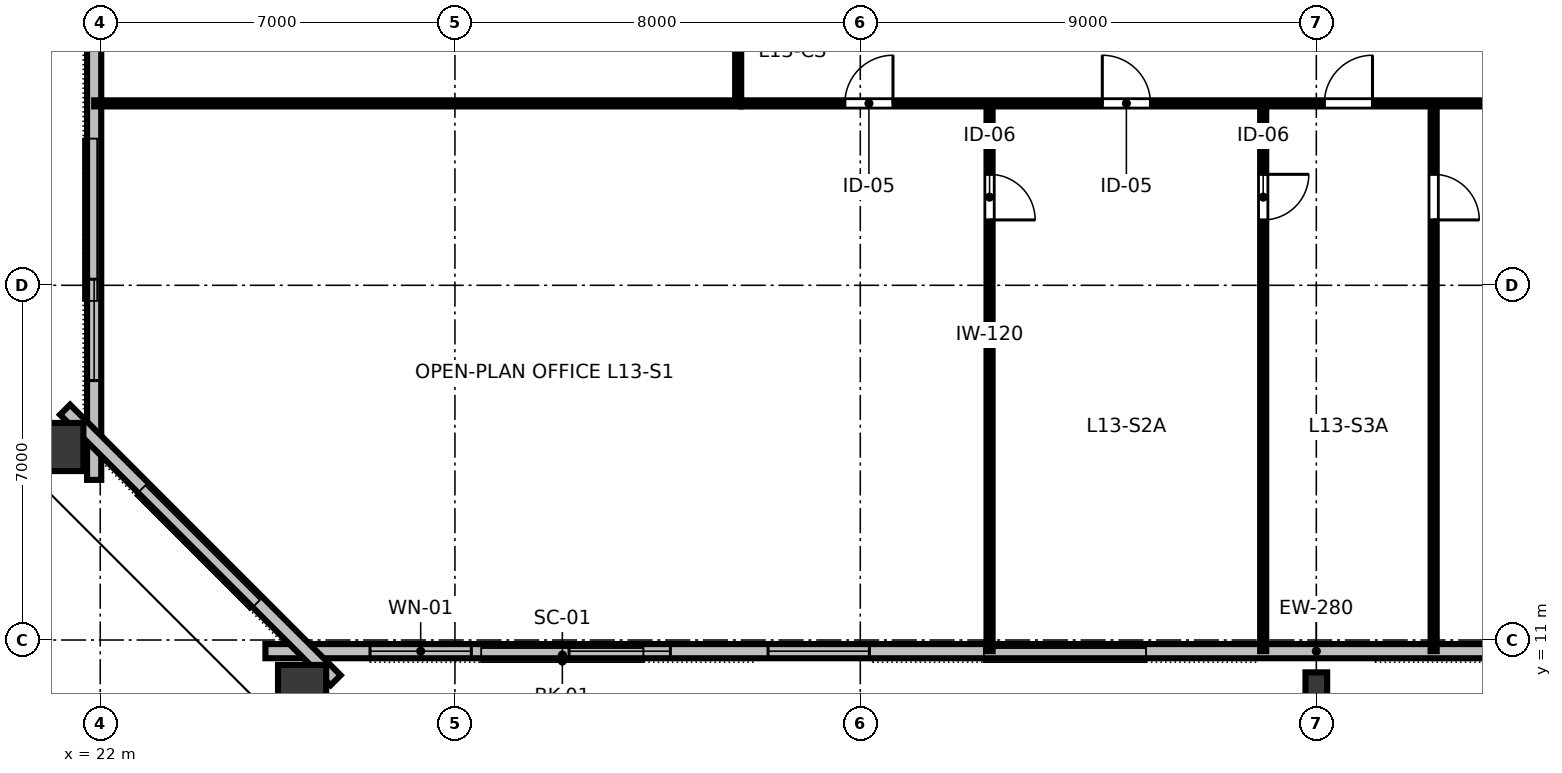
"""IFC4 building model, lengths in metres.
Left out: names, types, materials, properties, quantities, classifications, styles, units other than length and angle.
Written with IfcOpenShell. Run it as: python <this file> out.ifc"""

import sys

from ifc_helpers import new_model, si_unit, direction, frame, frame_2d, origin, origin_2d, place, context, subcontext, project, spatial, rectangle, hollow_rectangle, i_section, extrude, element, fill, save


model = new_model("IFC4")
c1 = context("Model", 3, precision=1e-05, world=origin(), true_north=direction((0.0, 1.0)))
c2 = subcontext(c1, "Body", "Model", "MODEL_VIEW")
j1 = project(units=[si_unit("LENGTHUNIT", "METRE"), si_unit("PLANEANGLEUNIT", "RADIAN")], contexts=[c1])
p1 = place(None, origin())
s1 = spatial("IfcSite", under=j1, at=p1, CompositionType="ELEMENT")
p2 = place(p1, origin())
s2 = spatial("IfcBuilding", under=s1, at=p2, CompositionType="ELEMENT")
p3 = place(p2, frame((0.0, 0.0, 53.2)))
s3 = spatial("IfcBuildingStorey", under=s2, at=p3, CompositionType="ELEMENT", Elevation=53.2)
p4 = place(p3, frame((25.984, 9.933, 0.0), z_axis=(0.0, 0.0, 1.0), x_axis=(1.0, 0.0, 0.0)))
e1 = element("IfcColumn", 1, at=p4, inside=s3, PredefinedType="COLUMN", context=c2, shape_type="SweptSolid", body=[
    extrude(hollow_rectangle(XDim=0.95, YDim=1.15, WallThickness=0.06, at=origin_2d()), origin(), (0.0, 0.0, 1.0), 3.358),
])
p5 = place(p3, frame((46.0, 10.12, 0.0), z_axis=(0.0, 0.0, 1.0), x_axis=(1.0, 0.0, 0.0)))
e2 = element("IfcColumn", 2, at=p5, inside=s3, PredefinedType="COLUMN", context=c2, shape_type="SweptSolid", body=[
    extrude(i_section(OverallWidth=0.428, OverallDepth=0.483, WebThickness=0.051, FlangeThickness=0.082, FilletRadius=0.025, at=origin_2d()), origin(), (0.0, 0.0, 1.0), 3.358),
])
p6 = place(p3, frame((21.093, 14.809, 0.0), z_axis=(0.0, 0.0, 1.0), x_axis=(0.0, 1.0, 0.0)))
e3 = element("IfcColumn", 3, at=p6, inside=s3, PredefinedType="COLUMN", context=c2, shape_type="SweptSolid", body=[
    extrude(hollow_rectangle(XDim=0.95, YDim=1.15, WallThickness=0.06, at=origin_2d()), origin(), (0.0, 0.0, 1.0), 3.358),
])
p7 = place(p3, frame((25.26, 10.78, 0.0), z_axis=(0.0, 0.0, 1.0), x_axis=(1.0, 0.0, 0.0)))
e4 = element("IfcWall", 4, at=p7, inside=s3, PredefinedType="STANDARD", context=c2, shape_type="SweptSolid", body=[
    extrude(rectangle(XDim=41.48, YDim=0.28, at=frame_2d((20.74, 0.0))), origin(), (0.0, 0.0, 1.0), 3.36),
])
p8 = place(p7, frame((2.064, 0.0, 0.8)))
e5 = element("IfcOpeningElement", 5, at=p8, cuts=e4, PredefinedType="OPENING", context=c2, shape_type="SweptSolid", body=[
    extrude(rectangle(XDim=2.0, YDim=1.95, at=frame_2d((1.0, 0.975))), frame((0.0, 0.15, 0.0), z_axis=(0.0, -1.0, 0.0), x_axis=(1.0, 0.0, 0.0)), (0.0, 0.0, 1.0), 0.3),
])
p9 = place(p7, frame((5.992, 0.0, 0.8)))
e6 = element("IfcOpeningElement", 6, at=p9, cuts=e4, PredefinedType="OPENING", context=c2, shape_type="SweptSolid", body=[
    extrude(rectangle(XDim=2.0, YDim=1.95, at=frame_2d((1.0, 0.975))), frame((0.0, 0.15, 0.0), z_axis=(0.0, -1.0, 0.0), x_axis=(1.0, 0.0, 0.0)), (0.0, 0.0, 1.0), 0.3),
])
p10 = place(p7, frame((9.92, 0.0, 0.8)))
e7 = element("IfcOpeningElement", 7, at=p10, cuts=e4, PredefinedType="OPENING", context=c2, shape_type="SweptSolid", body=[
    extrude(rectangle(XDim=2.0, YDim=1.95, at=frame_2d((1.0, 0.975))), frame((0.0, 0.15, 0.0), z_axis=(0.0, -1.0, 0.0), x_axis=(1.0, 0.0, 0.0)), (0.0, 0.0, 1.0), 0.3),
])
p11 = place(p7, frame((25.632, 0.0, 0.8)))
e8 = element("IfcOpeningElement", 8, at=p11, cuts=e4, PredefinedType="OPENING", context=c2, shape_type="SweptSolid", body=[
    extrude(rectangle(XDim=2.0, YDim=1.95, at=frame_2d((1.0, 0.975))), frame((0.0, 0.15, 0.0), z_axis=(0.0, -1.0, 0.0), x_axis=(1.0, 0.0, 0.0)), (0.0, 0.0, 1.0), 0.3),
])
p12 = place(p7, frame((29.56, 0.0, 0.8)))
e9 = element("IfcOpeningElement", 9, at=p12, cuts=e4, PredefinedType="OPENING", context=c2, shape_type="SweptSolid", body=[
    extrude(rectangle(XDim=2.0, YDim=1.95, at=frame_2d((1.0, 0.975))), frame((0.0, 0.15, 0.0), z_axis=(0.0, -1.0, 0.0), x_axis=(1.0, 0.0, 0.0)), (0.0, 0.0, 1.0), 0.3),
])
p13 = place(p7, frame((33.488, 0.0, 0.8)))
e10 = element("IfcOpeningElement", 10, at=p13, cuts=e4, PredefinedType="OPENING", context=c2, shape_type="SweptSolid", body=[
    extrude(rectangle(XDim=2.0, YDim=1.95, at=frame_2d((1.0, 0.975))), frame((0.0, 0.15, 0.0), z_axis=(0.0, -1.0, 0.0), x_axis=(1.0, 0.0, 0.0)), (0.0, 0.0, 1.0), 0.3),
])
p14 = place(p7, frame((37.416, 0.0, 0.8)))
e11 = element("IfcOpeningElement", 11, at=p14, cuts=e4, PredefinedType="OPENING", context=c2, shape_type="SweptSolid", body=[
    extrude(rectangle(XDim=2.0, YDim=1.95, at=frame_2d((1.0, 0.975))), frame((0.0, 0.15, 0.0), z_axis=(0.0, -1.0, 0.0), x_axis=(1.0, 0.0, 0.0)), (0.0, 0.0, 1.0), 0.3),
])
p15 = place(p3, frame((21.88, 49.84, 0.0), z_axis=(0.0, 0.0, 1.0), x_axis=(0.0, -1.0, 0.0)))
e12 = element("IfcWall", 12, at=p15, inside=s3, PredefinedType="STANDARD", context=c2, shape_type="SweptSolid", body=[
    extrude(rectangle(XDim=35.68, YDim=0.28, at=frame_2d((17.84, 0.0))), origin(), (0.0, 0.0, 1.0), 3.36),
])
p16 = place(p15, frame((1.96, 0.0, 0.8)))
e13 = element("IfcOpeningElement", 13, at=p16, cuts=e12, PredefinedType="OPENING", context=c2, shape_type="SweptSolid", body=[
    extrude(rectangle(XDim=2.0, YDim=1.95, at=frame_2d((1.0, 0.975))), frame((0.0, 0.15, 0.0), z_axis=(0.0, -1.0, 0.0), x_axis=(1.0, 0.0, 0.0)), (0.0, 0.0, 1.0), 0.3),
])
p17 = place(p15, frame((9.4, 0.0, 0.8)))
e14 = element("IfcOpeningElement", 14, at=p17, cuts=e12, PredefinedType="OPENING", context=c2, shape_type="SweptSolid", body=[
    extrude(rectangle(XDim=2.0, YDim=1.95, at=frame_2d((1.0, 0.975))), frame((0.0, 0.15, 0.0), z_axis=(0.0, -1.0, 0.0), x_axis=(1.0, 0.0, 0.0)), (0.0, 0.0, 1.0), 0.3),
])
p18 = place(p15, frame((13.12, 0.0, 0.8)))
e15 = element("IfcOpeningElement", 15, at=p18, cuts=e12, PredefinedType="OPENING", context=c2, shape_type="SweptSolid", body=[
    extrude(rectangle(XDim=2.0, YDim=1.95, at=frame_2d((1.0, 0.975))), frame((0.0, 0.15, 0.0), z_axis=(0.0, -1.0, 0.0), x_axis=(1.0, 0.0, 0.0)), (0.0, 0.0, 1.0), 0.3),
])
p19 = place(p15, frame((20.56, 0.0, 0.8)))
e16 = element("IfcOpeningElement", 16, at=p19, cuts=e12, PredefinedType="OPENING", context=c2, shape_type="SweptSolid", body=[
    extrude(rectangle(XDim=2.0, YDim=1.95, at=frame_2d((1.0, 0.975))), frame((0.0, 0.15, 0.0), z_axis=(0.0, -1.0, 0.0), x_axis=(1.0, 0.0, 0.0)), (0.0, 0.0, 1.0), 0.3),
])
p20 = place(p15, frame((24.28, 0.0, 0.8)))
e17 = element("IfcOpeningElement", 17, at=p20, cuts=e12, PredefinedType="OPENING", context=c2, shape_type="SweptSolid", body=[
    extrude(rectangle(XDim=2.0, YDim=1.95, at=frame_2d((1.0, 0.975))), frame((0.0, 0.15, 0.0), z_axis=(0.0, -1.0, 0.0), x_axis=(1.0, 0.0, 0.0)), (0.0, 0.0, 1.0), 0.3),
])
p21 = place(p15, frame((31.72, 0.0, 0.8)))
e18 = element("IfcOpeningElement", 18, at=p21, cuts=e12, PredefinedType="OPENING", context=c2, shape_type="SweptSolid", body=[
    extrude(rectangle(XDim=2.0, YDim=1.95, at=frame_2d((1.0, 0.975))), frame((0.0, 0.15, 0.0), z_axis=(0.0, -1.0, 0.0), x_axis=(1.0, 0.0, 0.0)), (0.0, 0.0, 1.0), 0.3),
])
p22 = place(p3, frame((21.306, 15.545, 0.0), z_axis=(0.0, 0.0, 1.0), x_axis=(0.707106781187, -0.707106781187, 0.0)))
e19 = element("IfcWall", 19, at=p22, inside=s3, PredefinedType="STANDARD", context=c2, shape_type="SweptSolid", body=[
    extrude(rectangle(XDim=7.551, YDim=0.28, at=frame_2d((3.775, 0.0))), origin(), (0.0, 0.0, 1.0), 3.36),
])
p23 = place(p3, frame((39.551, 21.59, 0.0), z_axis=(0.0, 0.0, 1.0), x_axis=(0.0, -1.0, 0.0)))
e20 = element("IfcWall", 20, at=p23, inside=s3, PredefinedType="PARTITIONING", context=c2, shape_type="SweptSolid", body=[
    extrude(rectangle(XDim=10.81, YDim=0.12, at=frame_2d((5.405, 0.0))), origin(), (0.0, 0.0, 1.0), 2.64),
])
p24 = place(p23, frame((1.4, 0.0, 0.0)))
e21 = element("IfcOpeningElement", 21, at=p24, cuts=e20, PredefinedType="OPENING", context=c2, shape_type="SweptSolid", body=[
    extrude(rectangle(XDim=0.9, YDim=2.15, at=frame_2d((0.45, 1.075))), frame((0.0, 0.07, 0.0), z_axis=(0.0, -1.0, 0.0), x_axis=(1.0, 0.0, 0.0)), (0.0, 0.0, 1.0), 0.14),
])
p25 = place(p3, frame((44.952, 21.59, 0.0), z_axis=(0.0, 0.0, 1.0), x_axis=(0.0, -1.0, 0.0)))
e22 = element("IfcWall", 22, at=p25, inside=s3, PredefinedType="PARTITIONING", context=c2, shape_type="SweptSolid", body=[
    extrude(rectangle(XDim=10.81, YDim=0.12, at=frame_2d((5.405, 0.0))), origin(), (0.0, 0.0, 1.0), 2.64),
])
p26 = place(p25, frame((1.4, 0.0, 0.0)))
e23 = element("IfcOpeningElement", 23, at=p26, cuts=e22, PredefinedType="OPENING", context=c2, shape_type="SweptSolid", body=[
    extrude(rectangle(XDim=0.9, YDim=2.15, at=frame_2d((0.45, 1.075))), frame((0.0, 0.07, 0.0), z_axis=(0.0, -1.0, 0.0), x_axis=(1.0, 0.0, 0.0)), (0.0, 0.0, 1.0), 0.14),
])
p27 = place(p3, frame((48.316, 21.59, 0.0), z_axis=(0.0, 0.0, 1.0), x_axis=(0.0, -1.0, 0.0)))
e24 = element("IfcWall", 24, at=p27, inside=s3, PredefinedType="PARTITIONING", context=c2, shape_type="SweptSolid", body=[
    extrude(rectangle(XDim=10.81, YDim=0.12, at=frame_2d((5.405, 0.0))), origin(), (0.0, 0.0, 1.0), 2.64),
])
p28 = place(p27, frame((1.4, 0.0, 0.0)))
e25 = element("IfcOpeningElement", 25, at=p28, cuts=e24, PredefinedType="OPENING", context=c2, shape_type="SweptSolid", body=[
    extrude(rectangle(XDim=0.9, YDim=2.15, at=frame_2d((0.45, 1.075))), frame((0.0, 0.07, 0.0), z_axis=(0.0, -1.0, 0.0), x_axis=(1.0, 0.0, 0.0)), (0.0, 0.0, 1.0), 0.14),
])
p29 = place(p3, frame((34.65, 21.59, 0.0), z_axis=(0.0, 0.0, 1.0), x_axis=(1.0, 0.0, 0.0)))
e26 = element("IfcWall", 26, at=p29, inside=s3, PredefinedType="PARTITIONING", context=c2, shape_type="SweptSolid", body=[
    extrude(rectangle(XDim=22.7, YDim=0.12, at=frame_2d((11.35, 0.0))), origin(), (0.0, 0.0, 1.0), 2.64),
])
p30 = place(p29, frame((2.045, 0.0, 0.0)))
e27 = element("IfcOpeningElement", 27, at=p30, cuts=e26, PredefinedType="OPENING", context=c2, shape_type="SweptSolid", body=[
    extrude(rectangle(XDim=0.95, YDim=2.15, at=frame_2d((0.475, 1.075))), frame((0.0, 0.07, 0.0), z_axis=(0.0, -1.0, 0.0), x_axis=(1.0, 0.0, 0.0)), (0.0, 0.0, 1.0), 0.14),
])
p31 = place(p29, frame((7.126, 0.0, 0.0)))
e28 = element("IfcOpeningElement", 28, at=p31, cuts=e26, PredefinedType="OPENING", context=c2, shape_type="SweptSolid", body=[
    extrude(rectangle(XDim=0.95, YDim=2.15, at=frame_2d((0.475, 1.075))), frame((0.0, 0.07, 0.0), z_axis=(0.0, -1.0, 0.0), x_axis=(1.0, 0.0, 0.0)), (0.0, 0.0, 1.0), 0.14),
])
p32 = place(p29, frame((11.509, 0.0, 0.0)))
e29 = element("IfcOpeningElement", 29, at=p32, cuts=e26, PredefinedType="OPENING", context=c2, shape_type="SweptSolid", body=[
    extrude(rectangle(XDim=0.95, YDim=2.15, at=frame_2d((0.475, 1.075))), frame((0.0, 0.07, 0.0), z_axis=(0.0, -1.0, 0.0), x_axis=(1.0, 0.0, 0.0)), (0.0, 0.0, 1.0), 0.14),
])
p33 = place(p29, frame((17.638, 0.0, 0.0)))
e30 = element("IfcOpeningElement", 30, at=p33, cuts=e26, PredefinedType="OPENING", context=c2, shape_type="SweptSolid", body=[
    extrude(rectangle(XDim=0.95, YDim=2.15, at=frame_2d((0.475, 1.075))), frame((0.0, 0.07, 0.0), z_axis=(0.0, -1.0, 0.0), x_axis=(1.0, 0.0, 0.0)), (0.0, 0.0, 1.0), 0.14),
])
p34 = place(p3, frame((34.59, 21.65, 0.0), z_axis=(0.0, 0.0, 1.0), x_axis=(0.0, 1.0, 0.0)))
e31 = element("IfcWall", 31, at=p34, inside=s3, PredefinedType="PARTITIONING", context=c2, shape_type="SweptSolid", body=[
    extrude(rectangle(XDim=20.7, YDim=0.12, at=frame_2d((10.35, 0.0))), origin(), (0.0, 0.0, 1.0), 2.64),
])
p35 = place(p34, frame((9.875, 0.0, 0.0)))
e32 = element("IfcOpeningElement", 32, at=p35, cuts=e31, PredefinedType="OPENING", context=c2, shape_type="SweptSolid", body=[
    extrude(rectangle(XDim=0.95, YDim=2.15, at=frame_2d((0.475, 1.075))), frame((0.0, 0.07, 0.0), z_axis=(0.0, -1.0, 0.0), x_axis=(1.0, 0.0, 0.0)), (0.0, 0.0, 1.0), 0.14),
])
p36 = place(p3, frame((34.65, 21.59, 0.0), z_axis=(0.0, 0.0, 1.0), x_axis=(-1.0, 0.0, 0.0)))
e33 = element("IfcWall", 33, at=p36, inside=s3, PredefinedType="PARTITIONING", context=c2, shape_type="SweptSolid", body=[
    extrude(rectangle(XDim=12.77, YDim=0.12, at=frame_2d((6.385, 0.0))), origin(), (0.0, 0.0, 1.0), 2.64),
])
p37 = place(p8, origin())
e34 = element("IfcWindow", 34, at=p37, inside=s3, PartitioningType="SINGLE_PANEL", PredefinedType="WINDOW", context=c2, shape_type="SweptSolid", body=[
    extrude(rectangle(XDim=2.0, YDim=1.95, at=frame_2d((1.0, 0.975))), frame((0.0, 0.03, 0.0), z_axis=(0.0, -1.0, 0.0), x_axis=(1.0, 0.0, 0.0)), (0.0, 0.0, 1.0), 0.06),
])
fill(e5, e34)
p38 = place(p9, origin())
e35 = element("IfcWindow", 35, at=p38, inside=s3, PartitioningType="SINGLE_PANEL", PredefinedType="WINDOW", context=c2, shape_type="SweptSolid", body=[
    extrude(rectangle(XDim=2.0, YDim=1.95, at=frame_2d((1.0, 0.975))), frame((0.0, 0.03, 0.0), z_axis=(0.0, -1.0, 0.0), x_axis=(1.0, 0.0, 0.0)), (0.0, 0.0, 1.0), 0.06),
])
fill(e6, e35)
p39 = place(p10, origin())
e36 = element("IfcWindow", 36, at=p39, inside=s3, PartitioningType="SINGLE_PANEL", PredefinedType="WINDOW", context=c2, shape_type="SweptSolid", body=[
    extrude(rectangle(XDim=2.0, YDim=1.95, at=frame_2d((1.0, 0.975))), frame((0.0, 0.03, 0.0), z_axis=(0.0, -1.0, 0.0), x_axis=(1.0, 0.0, 0.0)), (0.0, 0.0, 1.0), 0.06),
])
fill(e7, e36)
p40 = place(p21, origin())
e37 = element("IfcWindow", 37, at=p40, inside=s3, PartitioningType="SINGLE_PANEL", PredefinedType="WINDOW", context=c2, shape_type="SweptSolid", body=[
    extrude(rectangle(XDim=2.0, YDim=1.95, at=frame_2d((1.0, 0.975))), frame((0.0, 0.03, 0.0), z_axis=(0.0, -1.0, 0.0), x_axis=(1.0, 0.0, 0.0)), (0.0, 0.0, 1.0), 0.06),
])
fill(e18, e37)
p41 = place(p24, origin())
e38 = element("IfcDoor", 38, at=p41, inside=s3, OperationType="SINGLE_SWING_RIGHT", PredefinedType="DOOR", context=c2, shape_type="SweptSolid", body=[
    extrude(rectangle(XDim=0.9, YDim=2.15, at=frame_2d((0.45, 1.075))), frame((0.0, 0.025, 0.0), z_axis=(0.0, -1.0, 0.0), x_axis=(1.0, 0.0, 0.0)), (0.0, 0.0, 1.0), 0.05),
])
fill(e21, e38)
p42 = place(p26, origin())
e39 = element("IfcDoor", 39, at=p42, inside=s3, OperationType="SINGLE_SWING_LEFT", PredefinedType="DOOR", context=c2, shape_type="SweptSolid", body=[
    extrude(rectangle(XDim=0.9, YDim=2.15, at=frame_2d((0.45, 1.075))), frame((0.0, 0.025, 0.0), z_axis=(0.0, -1.0, 0.0), x_axis=(1.0, 0.0, 0.0)), (0.0, 0.0, 1.0), 0.05),
])
fill(e23, e39)
p43 = place(p28, origin())
e40 = element("IfcDoor", 40, at=p43, inside=s3, OperationType="SINGLE_SWING_RIGHT", PredefinedType="DOOR", context=c2, shape_type="SweptSolid", body=[
    extrude(rectangle(XDim=0.9, YDim=2.15, at=frame_2d((0.45, 1.075))), frame((0.0, 0.025, 0.0), z_axis=(0.0, -1.0, 0.0), x_axis=(1.0, 0.0, 0.0)), (0.0, 0.0, 1.0), 0.05),
])
fill(e25, e40)
p44 = place(p30, origin())
e41 = element("IfcDoor", 41, at=p44, inside=s3, OperationType="SINGLE_SWING_RIGHT", PredefinedType="DOOR", context=c2, shape_type="SweptSolid", body=[
    extrude(rectangle(XDim=0.95, YDim=2.15, at=frame_2d((0.475, 1.075))), frame((0.0, 0.025, 0.0), z_axis=(0.0, -1.0, 0.0), x_axis=(1.0, 0.0, 0.0)), (0.0, 0.0, 1.0), 0.05),
])
fill(e27, e41)
p45 = place(p31, origin())
e42 = element("IfcDoor", 42, at=p45, inside=s3, OperationType="SINGLE_SWING_LEFT", PredefinedType="DOOR", context=c2, shape_type="SweptSolid", body=[
    extrude(rectangle(XDim=0.95, YDim=2.15, at=frame_2d((0.475, 1.075))), frame((0.0, 0.025, 0.0), z_axis=(0.0, -1.0, 0.0), x_axis=(1.0, 0.0, 0.0)), (0.0, 0.0, 1.0), 0.05),
])
fill(e28, e42)
p46 = place(p32, origin())
e43 = element("IfcDoor", 43, at=p46, inside=s3, OperationType="SINGLE_SWING_RIGHT", PredefinedType="DOOR", context=c2, shape_type="SweptSolid", body=[
    extrude(rectangle(XDim=0.95, YDim=2.15, at=frame_2d((0.475, 1.075))), frame((0.0, 0.025, 0.0), z_axis=(0.0, -1.0, 0.0), x_axis=(1.0, 0.0, 0.0)), (0.0, 0.0, 1.0), 0.05),
])
fill(e29, e43)
save(model, sys.argv[1])
